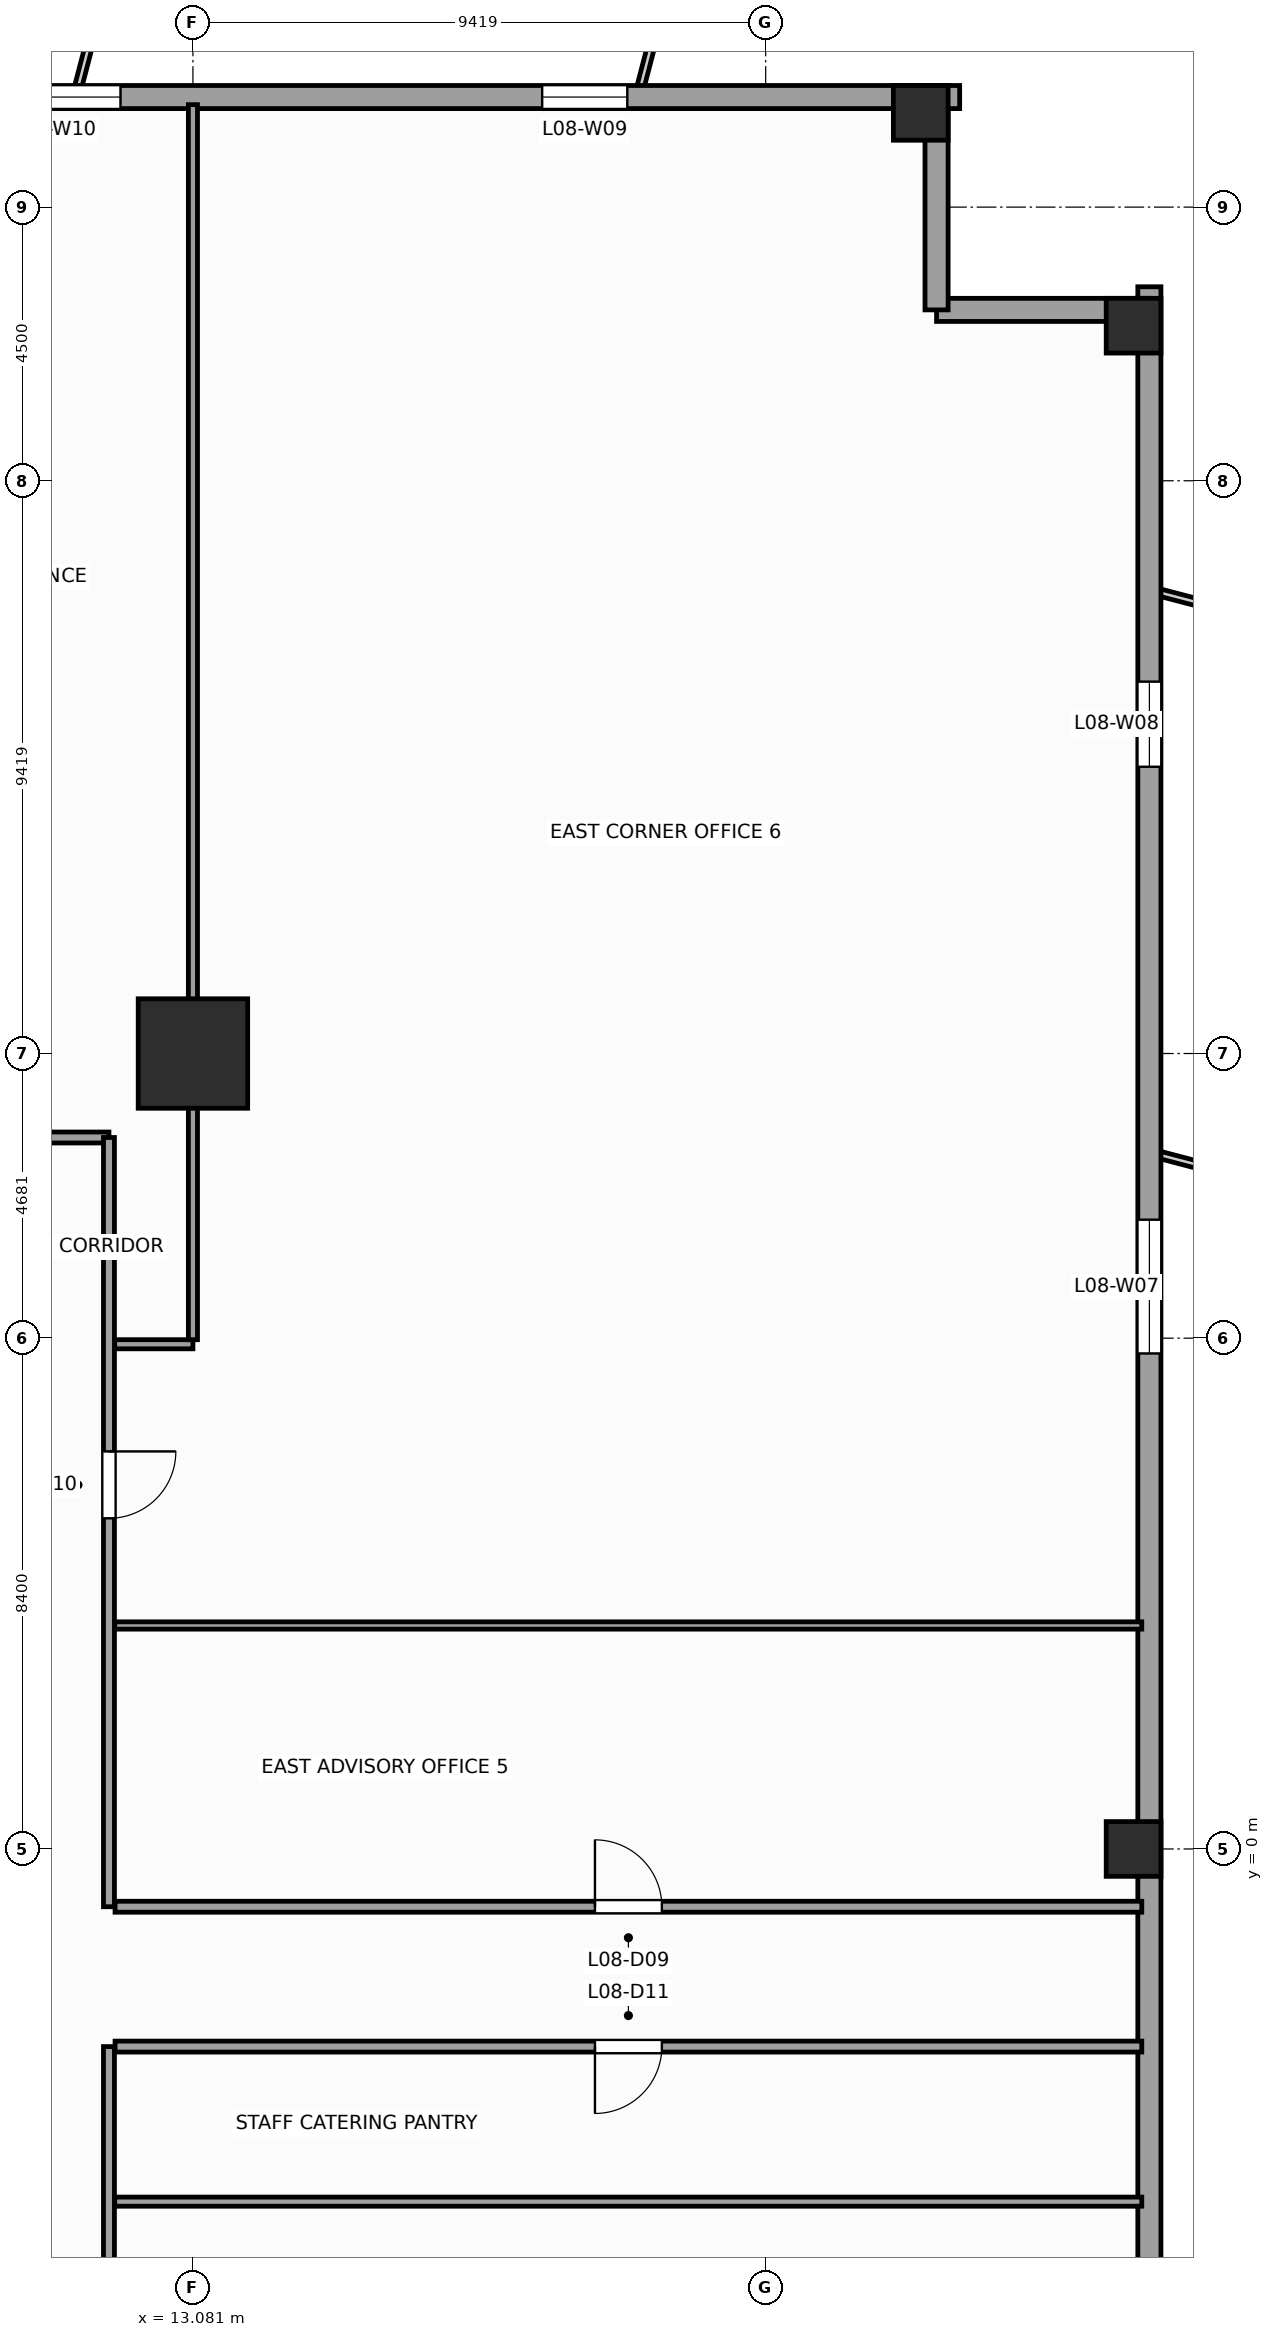
"""IFC4 building model, lengths in metres.
Left out: names, types, materials, properties, quantities, classifications, styles, units other than length and angle.
Written with IfcOpenShell. Run it as: python <this file> out.ifc"""

import sys

from ifc_helpers import new_model, si_unit, direction, frame, frame_2d, origin, origin_2d, place, context, subcontext, project, spatial, rectangle, extrude, source, transform, mapped, element, fill, save


model = new_model("IFC4")
c1 = context("Model", 3, precision=1e-05, world=origin(), true_north=direction((0.0, 1.0)))
c2 = subcontext(c1, "Body", "Model", "MODEL_VIEW")
j1 = project(units=[si_unit("LENGTHUNIT", "METRE"), si_unit("PLANEANGLEUNIT", "RADIAN")], contexts=[c1])
p1 = place(None, origin())
s1 = spatial("IfcSite", under=j1, at=p1, CompositionType="ELEMENT")
p2 = place(p1, origin())
s2 = spatial("IfcBuilding", under=s1, at=p2, CompositionType="ELEMENT")
p3 = place(p2, frame((0.0, 0.0, 38.0)))
s3 = spatial("IfcBuildingStorey", under=s2, at=p3, CompositionType="ELEMENT", Elevation=38.0)
m1 = source(origin(), c2, "Body", "SweptSolid", [
    extrude(rectangle(XDim=1.8, YDim=1.8, at=origin_2d()), origin(), (0.0, 0.0, 1.0), 4.0),
])
p4 = place(p3, frame((13.081, 13.081, 0.0), z_axis=(0.0, 0.0, 1.0), x_axis=(1.0, 0.0, 0.0)))
e1 = element("IfcColumn", 1, at=p4, inside=s3, PredefinedType="COLUMN", context=c2, shape_type="MappedRepresentation", body=[
    mapped(m1, transform((0.0, 0.0, 0.0), scale=1.0)),
])
m2 = source(origin(), c2, "Body", "SweptSolid", [
    extrude(rectangle(XDim=0.9, YDim=0.9, at=origin_2d()), origin(), (0.0, 0.0, 1.0), 4.0),
])
for number, where, z_axis, x_axis in (
    (2, (28.55, 0.0, 0.0), (0.0, 0.0, 1.0), (1.0, 0.0, 0.0)),
    (3, (28.55, 25.05, 0.0), (0.0, 0.0, 1.0), (1.0, 0.0, 0.0)),
    (4, (25.05, 28.55, 0.0), (0.0, 0.0, 1.0), (1.0, 0.0, 0.0)),
):
    element("IfcColumn", number, at=place(p3, frame(where, z_axis=z_axis, x_axis=x_axis)), inside=s3, PredefinedType="COLUMN", context=c2, shape_type="MappedRepresentation", body=[
        mapped(m2, transform((0.0, 0.0, 0.0), scale=1.0)),
    ])
p5 = place(p3, frame((28.81, -25.69, 0.0), z_axis=(0.0, 0.0, 1.0), x_axis=(0.0, 1.0, 0.0)))
e5 = element("IfcWall", 5, at=p5, inside=s3, PredefinedType="STANDARD", context=c2, shape_type="SweptSolid", body=[
    extrude(rectangle(XDim=51.38, YDim=0.38, at=frame_2d((25.69, 0.0))), origin(), (0.0, 0.0, 1.0), 3.12),
])
p6 = place(p5, frame((5.466, 0.0, 0.49)))
e6 = element("IfcOpeningElement", 6, at=p6, cuts=e5, PredefinedType="OPENING", context=c2, shape_type="SweptSolid", body=[
    extrude(rectangle(XDim=1.4, YDim=2.4, at=frame_2d((0.7, 1.2))), frame((0.0, 0.2, 0.0), z_axis=(0.0, -1.0, 0.0), x_axis=(1.0, 0.0, 0.0)), (0.0, 0.0, 1.0), 0.4),
])
p7 = place(p5, frame((13.8, 0.0, 0.49)))
e7 = element("IfcOpeningElement", 7, at=p7, cuts=e5, PredefinedType="OPENING", context=c2, shape_type="SweptSolid", body=[
    extrude(rectangle(XDim=2.2, YDim=2.4, at=frame_2d((1.1, 1.2))), frame((0.0, 0.2, 0.0), z_axis=(0.0, -1.0, 0.0), x_axis=(1.0, 0.0, 0.0)), (0.0, 0.0, 1.0), 0.4),
])
p8 = place(p5, frame((33.838, 0.0, 0.49)))
e8 = element("IfcOpeningElement", 8, at=p8, cuts=e5, PredefinedType="OPENING", context=c2, shape_type="SweptSolid", body=[
    extrude(rectangle(XDim=2.2, YDim=2.4, at=frame_2d((1.1, 1.2))), frame((0.0, 0.2, 0.0), z_axis=(0.0, -1.0, 0.0), x_axis=(1.0, 0.0, 0.0)), (0.0, 0.0, 1.0), 0.4),
])
p9 = place(p5, frame((43.487, 0.0, 0.49)))
e9 = element("IfcOpeningElement", 9, at=p9, cuts=e5, PredefinedType="OPENING", context=c2, shape_type="SweptSolid", body=[
    extrude(rectangle(XDim=1.4, YDim=2.4, at=frame_2d((0.7, 1.2))), frame((0.0, 0.2, 0.0), z_axis=(0.0, -1.0, 0.0), x_axis=(1.0, 0.0, 0.0)), (0.0, 0.0, 1.0), 0.4),
])
p10 = place(p3, frame((28.81, 25.31, 0.0), z_axis=(0.0, 0.0, 1.0), x_axis=(-1.0, 0.0, 0.0)))
e10 = element("IfcWall", 10, at=p10, inside=s3, PredefinedType="STANDARD", context=c2, shape_type="SweptSolid", body=[
    extrude(rectangle(XDim=3.5, YDim=0.38, at=frame_2d((1.75, 0.0))), origin(), (0.0, 0.0, 1.0), 3.72),
])
p11 = place(p3, frame((25.31, 25.31, 0.0), z_axis=(0.0, 0.0, 1.0), x_axis=(0.0, 1.0, 0.0)))
e11 = element("IfcWall", 11, at=p11, inside=s3, PredefinedType="STANDARD", context=c2, shape_type="SweptSolid", body=[
    extrude(rectangle(XDim=3.69, YDim=0.38, at=frame_2d((1.845, 0.0))), origin(), (0.0, 0.0, 1.0), 3.72),
])
p12 = place(p3, frame((25.69, 28.81, 0.0), z_axis=(0.0, 0.0, 1.0), x_axis=(-1.0, 0.0, 0.0)))
e12 = element("IfcWall", 12, at=p12, inside=s3, PredefinedType="STANDARD", context=c2, shape_type="SweptSolid", body=[
    extrude(rectangle(XDim=51.38, YDim=0.38, at=frame_2d((25.69, 0.0))), origin(), (0.0, 0.0, 1.0), 3.12),
])
p13 = place(p12, frame((29.915, 0.0, 0.0)))
e13 = element("IfcOpeningElement", 13, at=p13, cuts=e12, PredefinedType="OPENING", context=c2, shape_type="SweptSolid", body=[
    extrude(rectangle(XDim=1.05, YDim=2.25, at=frame_2d((0.525, 1.125))), frame((0.0, 0.2, 0.0), z_axis=(0.0, -1.0, 0.0), x_axis=(1.0, 0.0, 0.0)), (0.0, 0.0, 1.0), 0.4),
])
p14 = place(p12, frame((5.466, 0.0, 0.49)))
e14 = element("IfcOpeningElement", 14, at=p14, cuts=e12, PredefinedType="OPENING", context=c2, shape_type="SweptSolid", body=[
    extrude(rectangle(XDim=1.4, YDim=2.4, at=frame_2d((0.7, 1.2))), frame((0.0, 0.2, 0.0), z_axis=(0.0, -1.0, 0.0), x_axis=(1.0, 0.0, 0.0)), (0.0, 0.0, 1.0), 0.4),
])
p15 = place(p12, frame((13.8, 0.0, 0.49)))
e15 = element("IfcOpeningElement", 15, at=p15, cuts=e12, PredefinedType="OPENING", context=c2, shape_type="SweptSolid", body=[
    extrude(rectangle(XDim=2.2, YDim=2.4, at=frame_2d((1.1, 1.2))), frame((0.0, 0.2, 0.0), z_axis=(0.0, -1.0, 0.0), x_axis=(1.0, 0.0, 0.0)), (0.0, 0.0, 1.0), 0.4),
])
p16 = place(p12, frame((22.062, 0.0, 0.49)))
e16 = element("IfcOpeningElement", 16, at=p16, cuts=e12, PredefinedType="OPENING", context=c2, shape_type="SweptSolid", body=[
    extrude(rectangle(XDim=2.2, YDim=2.4, at=frame_2d((1.1, 1.2))), frame((0.0, 0.2, 0.0), z_axis=(0.0, -1.0, 0.0), x_axis=(1.0, 0.0, 0.0)), (0.0, 0.0, 1.0), 0.4),
])
p17 = place(p12, frame((33.838, 0.0, 0.49)))
e17 = element("IfcOpeningElement", 17, at=p17, cuts=e12, PredefinedType="OPENING", context=c2, shape_type="SweptSolid", body=[
    extrude(rectangle(XDim=2.2, YDim=2.4, at=frame_2d((1.1, 1.2))), frame((0.0, 0.2, 0.0), z_axis=(0.0, -1.0, 0.0), x_axis=(1.0, 0.0, 0.0)), (0.0, 0.0, 1.0), 0.4),
])
p18 = place(p12, frame((43.487, 0.0, 0.49)))
e18 = element("IfcOpeningElement", 18, at=p18, cuts=e12, PredefinedType="OPENING", context=c2, shape_type="SweptSolid", body=[
    extrude(rectangle(XDim=1.4, YDim=2.4, at=frame_2d((0.7, 1.2))), frame((0.0, 0.2, 0.0), z_axis=(0.0, -1.0, 0.0), x_axis=(1.0, 0.0, 0.0)), (0.0, 0.0, 1.0), 0.4),
])
p19 = place(p3, frame((-10.6, 11.7, 0.0), z_axis=(0.0, 0.0, 1.0), x_axis=(1.0, 0.0, 0.0)))
e19 = element("IfcWall", 19, at=p19, inside=s3, PredefinedType="PARTITIONING", context=c2, shape_type="SweptSolid", body=[
    extrude(rectangle(XDim=22.3, YDim=0.18, at=frame_2d((11.15, 0.0))), origin(), (0.0, 0.0, 1.0), 3.72),
])
p20 = place(p19, frame((2.014, 0.0, 0.0)))
e20 = element("IfcOpeningElement", 20, at=p20, cuts=e19, PredefinedType="OPENING", context=c2, shape_type="SweptSolid", body=[
    extrude(rectangle(XDim=1.1, YDim=2.2, at=frame_2d((0.55, 1.1))), frame((0.0, 0.1, 0.0), z_axis=(0.0, -1.0, 0.0), x_axis=(1.0, 0.0, 0.0)), (0.0, 0.0, 1.0), 0.2),
])
p21 = place(p19, frame((7.4, 0.0, 0.0)))
e21 = element("IfcOpeningElement", 21, at=p21, cuts=e19, PredefinedType="OPENING", context=c2, shape_type="SweptSolid", body=[
    extrude(rectangle(XDim=1.1, YDim=2.2, at=frame_2d((0.55, 1.1))), frame((0.0, 0.1, 0.0), z_axis=(0.0, -1.0, 0.0), x_axis=(1.0, 0.0, 0.0)), (0.0, 0.0, 1.0), 0.2),
])
p22 = place(p19, frame((13.4, 0.0, 0.0)))
e22 = element("IfcOpeningElement", 22, at=p22, cuts=e19, PredefinedType="OPENING", context=c2, shape_type="SweptSolid", body=[
    extrude(rectangle(XDim=1.1, YDim=2.2, at=frame_2d((0.55, 1.1))), frame((0.0, 0.1, 0.0), z_axis=(0.0, -1.0, 0.0), x_axis=(1.0, 0.0, 0.0)), (0.0, 0.0, 1.0), 0.2),
])
p23 = place(p19, frame((18.835, 0.0, 0.0)))
e23 = element("IfcOpeningElement", 23, at=p23, cuts=e19, PredefinedType="OPENING", context=c2, shape_type="SweptSolid", body=[
    extrude(rectangle(XDim=1.1, YDim=2.2, at=frame_2d((0.55, 1.1))), frame((0.0, 0.1, 0.0), z_axis=(0.0, -1.0, 0.0), x_axis=(1.0, 0.0, 0.0)), (0.0, 0.0, 1.0), 0.2),
])
p24 = place(p3, frame((11.7, -10.6, 0.0), z_axis=(0.0, 0.0, 1.0), x_axis=(0.0, 1.0, 0.0)))
e24 = element("IfcWall", 24, at=p24, inside=s3, PredefinedType="PARTITIONING", context=c2, shape_type="SweptSolid", body=[
    extrude(rectangle(XDim=7.35, YDim=0.18, at=frame_2d((3.675, 0.0))), origin(), (0.0, 0.0, 1.0), 3.72),
])
p25 = place(p3, frame((11.7, -0.95, 0.0), z_axis=(0.0, 0.0, 1.0), x_axis=(0.0, 1.0, 0.0)))
e25 = element("IfcWall", 25, at=p25, inside=s3, PredefinedType="PARTITIONING", context=c2, shape_type="SweptSolid", body=[
    extrude(rectangle(XDim=12.65, YDim=0.18, at=frame_2d((6.325, 0.0))), origin(), (0.0, 0.0, 1.0), 3.72),
])
p26 = place(p25, frame((6.387, 0.0, 0.0)))
e26 = element("IfcOpeningElement", 26, at=p26, cuts=e25, PredefinedType="OPENING", context=c2, shape_type="SweptSolid", body=[
    extrude(rectangle(XDim=1.1, YDim=2.2, at=frame_2d((0.55, 1.1))), frame((0.0, 0.1, 0.0), z_axis=(0.0, -1.0, 0.0), x_axis=(1.0, 0.0, 0.0)), (0.0, 0.0, 1.0), 0.2),
])
p27 = place(p3, frame((11.8, -3.25, 0.0), z_axis=(0.0, 0.0, 1.0), x_axis=(1.0, 0.0, 0.0)))
e27 = element("IfcWall", 27, at=p27, inside=s3, PredefinedType="PARTITIONING", context=c2, shape_type="SweptSolid", body=[
    extrude(rectangle(XDim=16.885, YDim=0.18, at=frame_2d((8.442, 0.0))), origin(), (0.0, 0.0, 1.0), 3.72),
])
p28 = place(p27, frame((7.893, 0.0, 0.0)))
e28 = element("IfcOpeningElement", 28, at=p28, cuts=e27, PredefinedType="OPENING", context=c2, shape_type="SweptSolid", body=[
    extrude(rectangle(XDim=1.1, YDim=2.2, at=frame_2d((0.55, 1.1))), frame((0.0, 0.1, 0.0), z_axis=(0.0, -1.0, 0.0), x_axis=(1.0, 0.0, 0.0)), (0.0, 0.0, 1.0), 0.2),
])
p29 = place(p3, frame((11.8, -0.95, 0.0), z_axis=(0.0, 0.0, 1.0), x_axis=(1.0, 0.0, 0.0)))
e29 = element("IfcWall", 29, at=p29, inside=s3, PredefinedType="PARTITIONING", context=c2, shape_type="SweptSolid", body=[
    extrude(rectangle(XDim=16.885, YDim=0.18, at=frame_2d((8.442, 0.0))), origin(), (0.0, 0.0, 1.0), 3.72),
])
p30 = place(p29, frame((7.893, 0.0, 0.0)))
e30 = element("IfcOpeningElement", 30, at=p30, cuts=e29, PredefinedType="OPENING", context=c2, shape_type="SweptSolid", body=[
    extrude(rectangle(XDim=1.1, YDim=2.2, at=frame_2d((0.55, 1.1))), frame((0.0, 0.1, 0.0), z_axis=(0.0, -1.0, 0.0), x_axis=(1.0, 0.0, 0.0)), (0.0, 0.0, 1.0), 0.2),
])
p31 = place(p3, frame((11.795, 8.3, 0.0), z_axis=(0.0, 0.0, 1.0), x_axis=(1.0, 0.0, 0.0)))
e31 = element("IfcWall", 31, at=p31, inside=s3, PredefinedType="PARTITIONING", context=c2, shape_type="SweptSolid", body=[
    extrude(rectangle(XDim=1.286, YDim=0.15, at=frame_2d((0.643, 0.0))), origin(), (0.0, 0.0, 1.0), 3.72),
])
p32 = place(p3, frame((13.081, 8.375, 0.0), z_axis=(0.0, 0.0, 1.0), x_axis=(0.0, 1.0, 0.0)))
e32 = element("IfcWall", 32, at=p32, inside=s3, PredefinedType="PARTITIONING", context=c2, shape_type="SweptSolid", body=[
    extrude(rectangle(XDim=20.31, YDim=0.15, at=frame_2d((10.155, 0.0))), origin(), (0.0, 0.0, 1.0), 2.712),
])
p33 = place(p3, frame((11.795, 3.675, 0.0), z_axis=(0.0, 0.0, 1.0), x_axis=(1.0, 0.0, 0.0)))
e33 = element("IfcWall", 33, at=p33, inside=s3, PredefinedType="PARTITIONING", context=c2, shape_type="SweptSolid", body=[
    extrude(rectangle(XDim=16.89, YDim=0.12, at=frame_2d((8.445, 0.0))), origin(), (0.0, 0.0, 1.0), 3.72),
])
p34 = place(p3, frame((11.795, -5.8, 0.0), z_axis=(0.0, 0.0, 1.0), x_axis=(1.0, 0.0, 0.0)))
e34 = element("IfcWall", 34, at=p34, inside=s3, PredefinedType="PARTITIONING", context=c2, shape_type="SweptSolid", body=[
    extrude(rectangle(XDim=16.89, YDim=0.15, at=frame_2d((8.445, 0.0))), origin(), (0.0, 0.0, 1.0), 3.72),
])
m3 = source(origin(), c2, "Body", "SweptSolid", [
    extrude(rectangle(XDim=2.2, YDim=2.4, at=frame_2d((1.1, 1.2))), frame((0.0, 0.03, 0.0), z_axis=(0.0, -1.0, 0.0), x_axis=(1.0, 0.0, 0.0)), (0.0, 0.0, 1.0), 0.06),
])
p35 = place(p8, origin())
e35 = element("IfcWindow", 35, at=p35, inside=s3, PartitioningType="SINGLE_PANEL", PredefinedType="WINDOW", context=c2, shape_type="MappedRepresentation", body=[
    mapped(m3, transform((0.0, 0.0, 0.0), scale=1.0)),
])
fill(e8, e35)
m4 = source(origin(), c2, "Body", "SweptSolid", [
    extrude(rectangle(XDim=1.4, YDim=2.4, at=frame_2d((0.7, 1.2))), frame((0.0, 0.03, 0.0), z_axis=(0.0, -1.0, 0.0), x_axis=(1.0, 0.0, 0.0)), (0.0, 0.0, 1.0), 0.06),
])
p36 = place(p9, origin())
e36 = element("IfcWindow", 36, at=p36, inside=s3, PartitioningType="SINGLE_PANEL", PredefinedType="WINDOW", context=c2, shape_type="MappedRepresentation", body=[
    mapped(m4, transform((0.0, 0.0, 0.0), scale=1.0)),
])
fill(e9, e36)
p37 = place(p14, origin())
e37 = element("IfcWindow", 37, at=p37, inside=s3, PartitioningType="SINGLE_PANEL", PredefinedType="WINDOW", context=c2, shape_type="MappedRepresentation", body=[
    mapped(m4, transform((0.0, 0.0, 0.0), scale=1.0)),
])
fill(e14, e37)
p38 = place(p15, origin())
e38 = element("IfcWindow", 38, at=p38, inside=s3, PartitioningType="SINGLE_PANEL", PredefinedType="WINDOW", context=c2, shape_type="MappedRepresentation", body=[
    mapped(m3, transform((0.0, 0.0, 0.0), scale=1.0)),
])
fill(e15, e38)
m5 = source(origin(), c2, "Body", "SweptSolid", [
    extrude(rectangle(XDim=1.1, YDim=2.2, at=frame_2d((0.55, 1.1))), frame((0.0, 0.025, 0.0), z_axis=(0.0, -1.0, 0.0), x_axis=(1.0, 0.0, 0.0)), (0.0, 0.0, 1.0), 0.05),
])
p39 = place(p30, origin())
e39 = element("IfcDoor", 39, at=p39, inside=s3, OperationType="SINGLE_SWING_LEFT", PredefinedType="DOOR", context=c2, shape_type="MappedRepresentation", body=[
    mapped(m5, transform((0.0, 0.0, 0.0), scale=1.0)),
])
fill(e30, e39)
p40 = place(p26, frame((1.1, 0.0, 0.0), z_axis=(0.0, 0.0, 1.0), x_axis=(-1.0, 0.0, 0.0)))
e40 = element("IfcDoor", 40, at=p40, inside=s3, OperationType="SINGLE_SWING_RIGHT", PredefinedType="DOOR", context=c2, shape_type="MappedRepresentation", body=[
    mapped(m5, transform((0.0, 0.0, 0.0), scale=1.0)),
])
fill(e26, e40)
p41 = place(p28, frame((1.1, 0.0, 0.0), z_axis=(0.0, 0.0, 1.0), x_axis=(-1.0, 0.0, 0.0)))
e41 = element("IfcDoor", 41, at=p41, inside=s3, OperationType="SINGLE_SWING_LEFT", PredefinedType="DOOR", context=c2, shape_type="MappedRepresentation", body=[
    mapped(m5, transform((0.0, 0.0, 0.0), scale=1.0)),
])
fill(e28, e41)
save(model, sys.argv[1])
